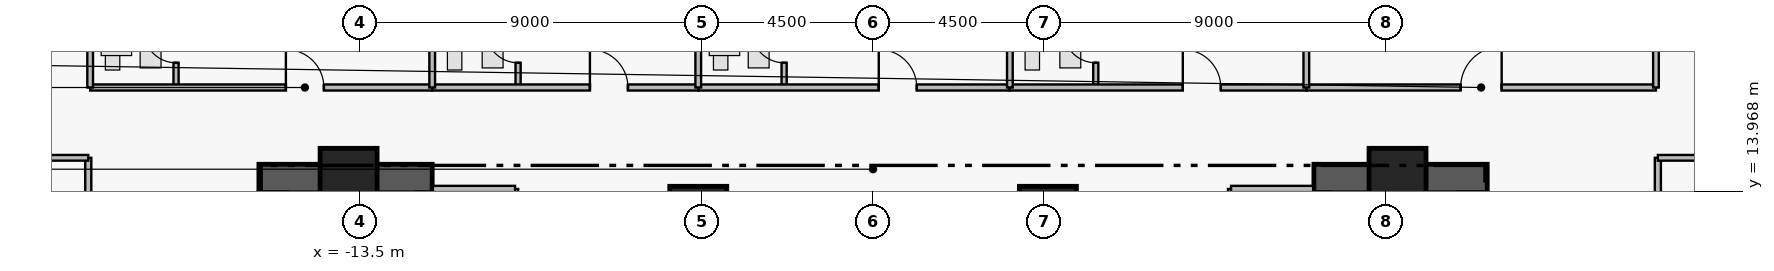
"""IFC4 building model, lengths in metres.
Left out: names, types, materials, properties, quantities, classifications, styles, units other than length and angle.
Written with IfcOpenShell. Run it as: python <this file> out.ifc"""

import sys

from ifc_helpers import new_model, si_unit, direction, frame, frame_2d, origin, origin_2d, place, context, subcontext, project, spatial, rectangle, extrude, element, fill, save


model = new_model("IFC4")
c1 = context("Model", 3, precision=1e-05, world=origin(), true_north=direction((0.0, 1.0)))
c2 = subcontext(c1, "Body", "Model", "MODEL_VIEW")
j1 = project(units=[si_unit("LENGTHUNIT", "METRE"), si_unit("PLANEANGLEUNIT", "RADIAN")], contexts=[c1])
p1 = place(None, origin())
s1 = spatial("IfcSite", under=j1, at=p1, CompositionType="ELEMENT")
p2 = place(p1, origin())
s2 = spatial("IfcBuilding", under=s1, at=p2, CompositionType="ELEMENT")
p3 = place(p2, frame((0.0, 0.0, 121.2)))
s3 = spatial("IfcBuildingStorey", under=s2, at=p3, CompositionType="ELEMENT", Elevation=121.2)
for number, where, z_axis, x_axis in (
    (1, (-16.16, 14.305, 0.0), (0.0, 0.0, 1.0), (1.0, 0.0, 0.0)),
    (2, (11.6, 14.305, 0.0), (0.0, 0.0, 1.0), (1.0, 0.0, 0.0)),
):
    element("IfcWall", number, at=place(p3, frame(where, z_axis=z_axis, x_axis=x_axis)), inside=s3, PredefinedType="SHEAR", context=c2, shape_type="SweptSolid", body=[
        extrude(rectangle(XDim=4.56, YDim=0.75, at=frame_2d((2.28, 0.0))), origin(), (0.0, 0.0, 1.0), 3.46),
    ])
for number, where, z_axis, x_axis in (
    (3, (-13.8, 14.35, 0.0), (0.0, 0.0, 1.0), (1.0, 0.0, 0.0)),
    (4, (-4.6, 13.35, 0.0), (0.0, 0.0, 1.0), (1.0, 0.0, 0.0)),
    (5, (4.6, 13.35, 0.0), (0.0, 0.0, 1.0), (1.0, 0.0, 0.0)),
    (6, (13.8, 14.35, 0.0), (0.0, 0.0, 1.0), (1.0, 0.0, 0.0)),
):
    element("IfcColumn", number, at=place(p3, frame(where, z_axis=z_axis, x_axis=x_axis)), inside=s3, PredefinedType="COLUMN", context=c2, shape_type="SweptSolid", body=[
        extrude(rectangle(XDim=1.5, YDim=1.5, at=origin_2d()), origin(), (0.0, 0.0, 1.0), 3.65),
    ])
p4 = place(p3, frame((-18.34, 16.7, 0.0), z_axis=(0.0, 0.0, 1.0), x_axis=(0.0, 1.0, 0.0)))
e7 = element("IfcWall", 7, at=p4, inside=s3, PredefinedType="PLUMBINGWALL", context=c2, shape_type="SweptSolid", body=[
    extrude(rectangle(XDim=2.36, YDim=0.135, at=frame_2d((1.18, 0.0))), origin(), (0.0, 0.0, 1.0), 3.43),
])
p5 = place(p4, frame((0.65, 0.0, 0.0)))
e8 = element("IfcOpeningElement", 8, at=p5, cuts=e7, PredefinedType="OPENING", context=c2, shape_type="SweptSolid", body=[
    extrude(rectangle(XDim=0.85, YDim=2.1, at=frame_2d((0.425, 1.05))), frame((0.0, 0.077, 0.0), z_axis=(0.0, -1.0, 0.0), x_axis=(1.0, 0.0, 0.0)), (0.0, 0.0, 1.0), 0.155),
])
p6 = place(p3, frame((-20.6, 16.7, 0.0), z_axis=(0.0, 0.0, 1.0), x_axis=(1.0, 0.0, 0.0)))
e9 = element("IfcWall", 9, at=p6, inside=s3, PredefinedType="PARTITIONING", context=c2, shape_type="SweptSolid", body=[
    extrude(rectangle(XDim=9.0, YDim=0.16, at=frame_2d((4.5, 0.0))), origin(), (0.0, 0.0, 1.0), 2.973),
])
p7 = place(p6, frame((5.15, 0.0, 0.0)))
e10 = element("IfcOpeningElement", 10, at=p7, cuts=e9, PredefinedType="OPENING", context=c2, shape_type="SweptSolid", body=[
    extrude(rectangle(XDim=1.0, YDim=2.15, at=frame_2d((0.5, 1.075))), frame((0.0, 0.09, 0.0), z_axis=(0.0, -1.0, 0.0), x_axis=(1.0, 0.0, 0.0)), (0.0, 0.0, 1.0), 0.18),
])
p8 = place(p3, frame((-9.34, 16.7, 0.0), z_axis=(0.0, 0.0, 1.0), x_axis=(0.0, 1.0, 0.0)))
e11 = element("IfcWall", 11, at=p8, inside=s3, PredefinedType="PLUMBINGWALL", context=c2, shape_type="SweptSolid", body=[
    extrude(rectangle(XDim=2.36, YDim=0.135, at=frame_2d((1.18, 0.0))), origin(), (0.0, 0.0, 1.0), 3.43),
])
p9 = place(p8, frame((0.65, 0.0, 0.0)))
e12 = element("IfcOpeningElement", 12, at=p9, cuts=e11, PredefinedType="OPENING", context=c2, shape_type="SweptSolid", body=[
    extrude(rectangle(XDim=0.85, YDim=2.1, at=frame_2d((0.425, 1.05))), frame((0.0, 0.077, 0.0), z_axis=(0.0, -1.0, 0.0), x_axis=(1.0, 0.0, 0.0)), (0.0, 0.0, 1.0), 0.155),
])
p10 = place(p3, frame((-11.6, 16.7, 0.0), z_axis=(0.0, 0.0, 1.0), x_axis=(1.0, 0.0, 0.0)))
e13 = element("IfcWall", 13, at=p10, inside=s3, PredefinedType="PARTITIONING", context=c2, shape_type="SweptSolid", body=[
    extrude(rectangle(XDim=7.0, YDim=0.16, at=frame_2d((3.5, 0.0))), origin(), (0.0, 0.0, 1.0), 2.973),
])
p11 = place(p10, frame((4.15, 0.0, 0.0)))
e14 = element("IfcOpeningElement", 14, at=p11, cuts=e13, PredefinedType="OPENING", context=c2, shape_type="SweptSolid", body=[
    extrude(rectangle(XDim=1.0, YDim=2.15, at=frame_2d((0.5, 1.075))), frame((0.0, 0.09, 0.0), z_axis=(0.0, -1.0, 0.0), x_axis=(1.0, 0.0, 0.0)), (0.0, 0.0, 1.0), 0.18),
])
p12 = place(p3, frame((-2.34, 16.7, 0.0), z_axis=(0.0, 0.0, 1.0), x_axis=(0.0, 1.0, 0.0)))
e15 = element("IfcWall", 15, at=p12, inside=s3, PredefinedType="PLUMBINGWALL", context=c2, shape_type="SweptSolid", body=[
    extrude(rectangle(XDim=2.36, YDim=0.135, at=frame_2d((1.18, 0.0))), origin(), (0.0, 0.0, 1.0), 3.43),
])
p13 = place(p12, frame((0.65, 0.0, 0.0)))
e16 = element("IfcOpeningElement", 16, at=p13, cuts=e15, PredefinedType="OPENING", context=c2, shape_type="SweptSolid", body=[
    extrude(rectangle(XDim=0.85, YDim=2.1, at=frame_2d((0.425, 1.05))), frame((0.0, 0.077, 0.0), z_axis=(0.0, -1.0, 0.0), x_axis=(1.0, 0.0, 0.0)), (0.0, 0.0, 1.0), 0.155),
])
p14 = place(p3, frame((-4.6, 16.7, 0.0), z_axis=(0.0, 0.0, 1.0), x_axis=(1.0, 0.0, 0.0)))
e17 = element("IfcWall", 17, at=p14, inside=s3, PredefinedType="PARTITIONING", context=c2, shape_type="SweptSolid", body=[
    extrude(rectangle(XDim=8.2, YDim=0.16, at=frame_2d((4.1, 0.0))), origin(), (0.0, 0.0, 1.0), 2.973),
])
p15 = place(p14, frame((4.75, 0.0, 0.0)))
e18 = element("IfcOpeningElement", 18, at=p15, cuts=e17, PredefinedType="OPENING", context=c2, shape_type="SweptSolid", body=[
    extrude(rectangle(XDim=1.0, YDim=2.15, at=frame_2d((0.5, 1.075))), frame((0.0, 0.09, 0.0), z_axis=(0.0, -1.0, 0.0), x_axis=(1.0, 0.0, 0.0)), (0.0, 0.0, 1.0), 0.18),
])
p16 = place(p3, frame((5.86, 16.7, 0.0), z_axis=(0.0, 0.0, 1.0), x_axis=(0.0, 1.0, 0.0)))
e19 = element("IfcWall", 19, at=p16, inside=s3, PredefinedType="PLUMBINGWALL", context=c2, shape_type="SweptSolid", body=[
    extrude(rectangle(XDim=2.36, YDim=0.135, at=frame_2d((1.18, 0.0))), origin(), (0.0, 0.0, 1.0), 3.43),
])
p17 = place(p16, frame((0.65, 0.0, 0.0)))
e20 = element("IfcOpeningElement", 20, at=p17, cuts=e19, PredefinedType="OPENING", context=c2, shape_type="SweptSolid", body=[
    extrude(rectangle(XDim=0.85, YDim=2.1, at=frame_2d((0.425, 1.05))), frame((0.0, 0.077, 0.0), z_axis=(0.0, -1.0, 0.0), x_axis=(1.0, 0.0, 0.0)), (0.0, 0.0, 1.0), 0.155),
])
p18 = place(p3, frame((3.6, 16.7, 0.0), z_axis=(0.0, 0.0, 1.0), x_axis=(1.0, 0.0, 0.0)))
e21 = element("IfcWall", 21, at=p18, inside=s3, PredefinedType="PARTITIONING", context=c2, shape_type="SweptSolid", body=[
    extrude(rectangle(XDim=7.8, YDim=0.16, at=frame_2d((3.9, 0.0))), origin(), (0.0, 0.0, 1.0), 2.973),
])
p19 = place(p18, frame((4.55, 0.0, 0.0)))
e22 = element("IfcOpeningElement", 22, at=p19, cuts=e21, PredefinedType="OPENING", context=c2, shape_type="SweptSolid", body=[
    extrude(rectangle(XDim=1.0, YDim=2.15, at=frame_2d((0.5, 1.075))), frame((0.0, 0.09, 0.0), z_axis=(0.0, -1.0, 0.0), x_axis=(1.0, 0.0, 0.0)), (0.0, 0.0, 1.0), 0.18),
])
p20 = place(p3, frame((11.4, 16.7, 0.0), z_axis=(0.0, 0.0, 1.0), x_axis=(1.0, 0.0, 0.0)))
e23 = element("IfcWall", 23, at=p20, inside=s3, PredefinedType="PARTITIONING", context=c2, shape_type="SweptSolid", body=[
    extrude(rectangle(XDim=9.2, YDim=0.16, at=frame_2d((4.6, 0.0))), origin(), (0.0, 0.0, 1.0), 2.973),
])
p21 = place(p20, frame((4.06, 0.0, 0.0)))
e24 = element("IfcOpeningElement", 24, at=p21, cuts=e23, PredefinedType="OPENING", context=c2, shape_type="SweptSolid", body=[
    extrude(rectangle(XDim=1.08, YDim=2.18, at=frame_2d((0.54, 1.09))), frame((0.0, 0.09, 0.0), z_axis=(0.0, -1.0, 0.0), x_axis=(1.0, 0.0, 0.0)), (0.0, 0.0, 1.0), 0.18),
])
p22 = place(p3, frame((20.65, 10.18, 0.0), z_axis=(0.0, 0.0, 1.0), x_axis=(0.0, 1.0, 0.0)))
e25 = element("IfcWall", 25, at=p22, inside=s3, PredefinedType="PARTITIONING", context=c2, shape_type="SweptSolid", body=[
    extrude(rectangle(XDim=4.67, YDim=0.16, at=frame_2d((2.335, 0.0))), origin(), (0.0, 0.0, 1.0), 3.43),
])
p23 = place(p22, frame((1.875, 0.0, 0.0)))
e26 = element("IfcOpeningElement", 26, at=p23, cuts=e25, PredefinedType="OPENING", context=c2, shape_type="SweptSolid", body=[
    extrude(rectangle(XDim=0.92, YDim=2.12, at=frame_2d((0.46, 1.06))), frame((0.0, 0.09, 0.0), z_axis=(0.0, -1.0, 0.0), x_axis=(1.0, 0.0, 0.0)), (0.0, 0.0, 1.0), 0.18),
])
p24 = place(p3, frame((-20.65, 1.55, 0.0), z_axis=(0.0, 0.0, 1.0), x_axis=(0.0, 1.0, 0.0)))
e27 = element("IfcWall", 27, at=p24, inside=s3, PredefinedType="PARTITIONING", context=c2, shape_type="SweptSolid", body=[
    extrude(rectangle(XDim=13.3, YDim=0.16, at=frame_2d((6.65, 0.0))), origin(), (0.0, 0.0, 1.0), 3.43),
])
p25 = place(p24, frame((6.175, 0.0, 0.0)))
e28 = element("IfcOpeningElement", 28, at=p25, cuts=e27, PredefinedType="OPENING", context=c2, shape_type="SweptSolid", body=[
    extrude(rectangle(XDim=0.95, YDim=2.15, at=frame_2d((0.475, 1.075))), frame((0.0, 0.09, 0.0), z_axis=(0.0, -1.0, 0.0), x_axis=(1.0, 0.0, 0.0)), (0.0, 0.0, 1.0), 0.18),
])
p26 = place(p3, frame((-9.42, 11.07, 0.0), z_axis=(0.0, 0.0, 1.0), x_axis=(0.0, 1.0, 0.0)))
e29 = element("IfcWall", 29, at=p26, inside=s3, PredefinedType="PARTITIONING", context=c2, shape_type="SweptSolid", body=[
    extrude(rectangle(XDim=2.96, YDim=0.165, at=frame_2d((1.48, 0.0))), origin(), (0.0, 0.0, 1.0), 3.43),
])
p27 = place(p3, frame((-11.58, 14.03, 0.0), z_axis=(0.0, 0.0, 1.0), x_axis=(1.0, 0.0, 0.0)))
e30 = element("IfcWall", 30, at=p27, inside=s3, PredefinedType="PARTITIONING", context=c2, shape_type="SweptSolid", body=[
    extrude(rectangle(XDim=2.16, YDim=0.165, at=frame_2d((1.08, 0.0))), origin(), (0.0, 0.0, 1.0), 3.43),
])
p28 = place(p3, frame((9.42, 11.07, 0.0), z_axis=(0.0, 0.0, 1.0), x_axis=(0.0, 1.0, 0.0)))
e31 = element("IfcWall", 31, at=p28, inside=s3, PredefinedType="PARTITIONING", context=c2, shape_type="SweptSolid", body=[
    extrude(rectangle(XDim=2.96, YDim=0.165, at=frame_2d((1.48, 0.0))), origin(), (0.0, 0.0, 1.0), 3.43),
])
p29 = place(p3, frame((9.42, 14.03, 0.0), z_axis=(0.0, 0.0, 1.0), x_axis=(1.0, 0.0, 0.0)))
e32 = element("IfcWall", 32, at=p29, inside=s3, PredefinedType="PARTITIONING", context=c2, shape_type="SweptSolid", body=[
    extrude(rectangle(XDim=2.16, YDim=0.165, at=frame_2d((1.08, 0.0))), origin(), (0.0, 0.0, 1.0), 3.43),
])
p30 = place(p3, frame((-20.6, 16.7, 0.0), z_axis=(0.0, 0.0, 1.0), x_axis=(0.0, 1.0, 0.0)))
e33 = element("IfcWall", 33, at=p30, inside=s3, PredefinedType="PARTITIONING", context=c2, shape_type="SweptSolid", body=[
    extrude(rectangle(XDim=8.2, YDim=0.15, at=frame_2d((4.1, 0.0))), origin(), (0.0, 0.0, 1.0), 3.43),
])
p31 = place(p3, frame((-11.6, 16.7, 0.0), z_axis=(0.0, 0.0, 1.0), x_axis=(0.0, 1.0, 0.0)))
e34 = element("IfcWall", 34, at=p31, inside=s3, PredefinedType="PARTITIONING", context=c2, shape_type="SweptSolid", body=[
    extrude(rectangle(XDim=11.62, YDim=0.15, at=frame_2d((5.81, 0.0))), origin(), (0.0, 0.0, 1.0), 3.43),
])
p32 = place(p3, frame((-4.6, 16.7, 0.0), z_axis=(0.0, 0.0, 1.0), x_axis=(0.0, 1.0, 0.0)))
e35 = element("IfcWall", 35, at=p32, inside=s3, PredefinedType="PARTITIONING", context=c2, shape_type="SweptSolid", body=[
    extrude(rectangle(XDim=11.62, YDim=0.15, at=frame_2d((5.81, 0.0))), origin(), (0.0, 0.0, 1.0), 2.503),
])
for number, where, z_axis, x_axis in (
    (36, (3.6, 16.7, 0.0), (0.0, 0.0, 1.0), (0.0, 1.0, 0.0)),
    (37, (11.4, 16.7, 0.0), (0.0, 0.0, 1.0), (0.0, 1.0, 0.0)),
):
    element("IfcWall", number, at=place(p3, frame(where, z_axis=z_axis, x_axis=x_axis)), inside=s3, PredefinedType="PARTITIONING", context=c2, shape_type="SweptSolid", body=[
        extrude(rectangle(XDim=11.62, YDim=0.15, at=frame_2d((5.81, 0.0))), origin(), (0.0, 0.0, 1.0), 3.43),
    ])
p33 = place(p3, frame((20.6, 16.7, 0.0), z_axis=(0.0, 0.0, 1.0), x_axis=(0.0, 1.0, 0.0)))
e38 = element("IfcWall", 38, at=p33, inside=s3, PredefinedType="PARTITIONING", context=c2, shape_type="SweptSolid", body=[
    extrude(rectangle(XDim=8.14, YDim=0.15, at=frame_2d((4.07, 0.0))), origin(), (0.0, 0.0, 1.0), 3.43),
])
for number, where, z_axis, x_axis in (
    (39, (20.65, 14.85, 0.0), (0.0, 0.0, 1.0), (1.0, 0.0, 0.0)),
    (40, (-23.84, 14.85, 0.0), (0.0, 0.0, 1.0), (1.0, 0.0, 0.0)),
):
    element("IfcWall", number, at=place(p3, frame(where, z_axis=z_axis, x_axis=x_axis)), inside=s3, PredefinedType="PARTITIONING", context=c2, shape_type="SweptSolid", body=[
        extrude(rectangle(XDim=3.19, YDim=0.15, at=frame_2d((1.595, 0.0))), origin(), (0.0, 0.0, 1.0), 3.43),
    ])
p34 = place(p5, origin())
e41 = element("IfcDoor", 41, at=p34, inside=s3, OperationType="SINGLE_SWING_RIGHT", PredefinedType="DOOR", context=c2, shape_type="SweptSolid", body=[
    extrude(rectangle(XDim=0.85, YDim=2.1, at=frame_2d((0.425, 1.05))), frame((0.0, 0.025, 0.0), z_axis=(0.0, -1.0, 0.0), x_axis=(1.0, 0.0, 0.0)), (0.0, 0.0, 1.0), 0.05),
])
fill(e8, e41)
p35 = place(p7, origin())
e42 = element("IfcDoor", 42, at=p35, inside=s3, OperationType="SINGLE_SWING_LEFT", PredefinedType="DOOR", context=c2, shape_type="SweptSolid", body=[
    extrude(rectangle(XDim=1.0, YDim=2.15, at=frame_2d((0.5, 1.075))), frame((0.0, 0.025, 0.0), z_axis=(0.0, -1.0, 0.0), x_axis=(1.0, 0.0, 0.0)), (0.0, 0.0, 1.0), 0.05),
])
fill(e10, e42)
p36 = place(p9, origin())
e43 = element("IfcDoor", 43, at=p36, inside=s3, OperationType="SINGLE_SWING_RIGHT", PredefinedType="DOOR", context=c2, shape_type="SweptSolid", body=[
    extrude(rectangle(XDim=0.85, YDim=2.1, at=frame_2d((0.425, 1.05))), frame((0.0, 0.025, 0.0), z_axis=(0.0, -1.0, 0.0), x_axis=(1.0, 0.0, 0.0)), (0.0, 0.0, 1.0), 0.05),
])
fill(e12, e43)
p37 = place(p11, origin())
e44 = element("IfcDoor", 44, at=p37, inside=s3, OperationType="SINGLE_SWING_LEFT", PredefinedType="DOOR", context=c2, shape_type="SweptSolid", body=[
    extrude(rectangle(XDim=1.0, YDim=2.15, at=frame_2d((0.5, 1.075))), frame((0.0, 0.025, 0.0), z_axis=(0.0, -1.0, 0.0), x_axis=(1.0, 0.0, 0.0)), (0.0, 0.0, 1.0), 0.05),
])
fill(e14, e44)
p38 = place(p13, origin())
e45 = element("IfcDoor", 45, at=p38, inside=s3, OperationType="SINGLE_SWING_RIGHT", PredefinedType="DOOR", context=c2, shape_type="SweptSolid", body=[
    extrude(rectangle(XDim=0.85, YDim=2.1, at=frame_2d((0.425, 1.05))), frame((0.0, 0.025, 0.0), z_axis=(0.0, -1.0, 0.0), x_axis=(1.0, 0.0, 0.0)), (0.0, 0.0, 1.0), 0.05),
])
fill(e16, e45)
p39 = place(p15, origin())
e46 = element("IfcDoor", 46, at=p39, inside=s3, OperationType="SINGLE_SWING_LEFT", PredefinedType="DOOR", context=c2, shape_type="SweptSolid", body=[
    extrude(rectangle(XDim=1.0, YDim=2.15, at=frame_2d((0.5, 1.075))), frame((0.0, 0.025, 0.0), z_axis=(0.0, -1.0, 0.0), x_axis=(1.0, 0.0, 0.0)), (0.0, 0.0, 1.0), 0.05),
])
fill(e18, e46)
p40 = place(p17, origin())
e47 = element("IfcDoor", 47, at=p40, inside=s3, OperationType="SINGLE_SWING_RIGHT", PredefinedType="DOOR", context=c2, shape_type="SweptSolid", body=[
    extrude(rectangle(XDim=0.85, YDim=2.1, at=frame_2d((0.425, 1.05))), frame((0.0, 0.025, 0.0), z_axis=(0.0, -1.0, 0.0), x_axis=(1.0, 0.0, 0.0)), (0.0, 0.0, 1.0), 0.05),
])
fill(e20, e47)
p41 = place(p19, origin())
e48 = element("IfcDoor", 48, at=p41, inside=s3, OperationType="SINGLE_SWING_LEFT", PredefinedType="DOOR", context=c2, shape_type="SweptSolid", body=[
    extrude(rectangle(XDim=1.0, YDim=2.15, at=frame_2d((0.5, 1.075))), frame((0.0, 0.025, 0.0), z_axis=(0.0, -1.0, 0.0), x_axis=(1.0, 0.0, 0.0)), (0.0, 0.0, 1.0), 0.05),
])
fill(e22, e48)
p42 = place(p21, origin())
e49 = element("IfcDoor", 49, at=p42, inside=s3, OperationType="SINGLE_SWING_RIGHT", PredefinedType="DOOR", context=c2, shape_type="SweptSolid", body=[
    extrude(rectangle(XDim=1.08, YDim=2.18, at=frame_2d((0.54, 1.09))), frame((0.0, 0.025, 0.0), z_axis=(0.0, -1.0, 0.0), x_axis=(1.0, 0.0, 0.0)), (0.0, 0.0, 1.0), 0.05),
])
fill(e24, e49)
save(model, sys.argv[1])
